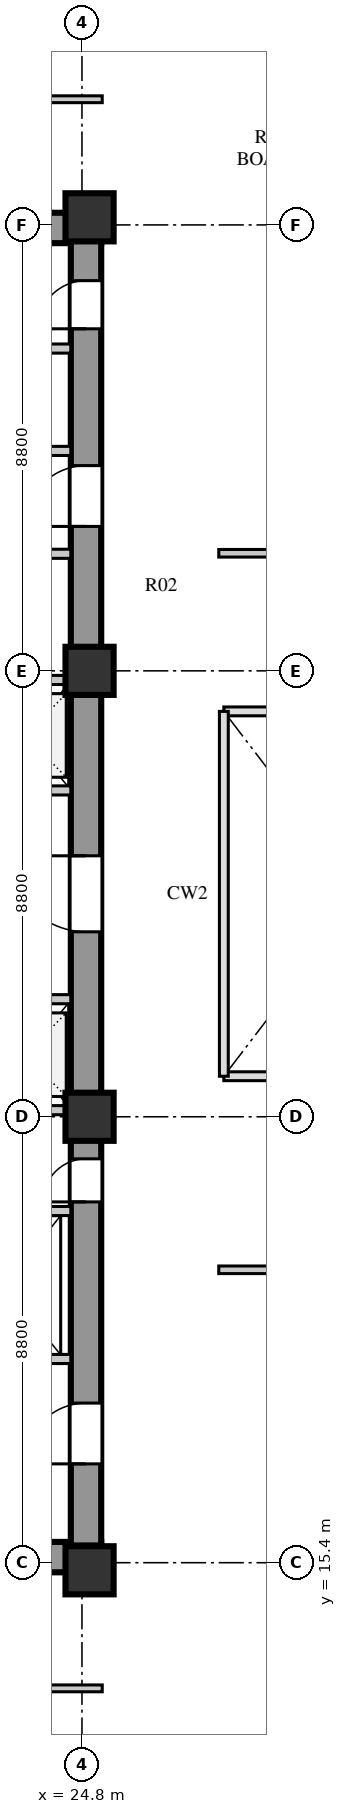
"""IFC4 building model, lengths in metres.
Left out: names, types, materials, properties, quantities, classifications, styles, units other than length and angle.
Written with IfcOpenShell. Run it as: python <this file> out.ifc"""

import sys

from ifc_helpers import new_model, si_unit, direction, frame, frame_2d, origin, origin_2d, place, context, subcontext, project, spatial, rectangle, extrude, element, fill, save


model = new_model("IFC4")
c1 = context("Model", 3, precision=1e-05, world=origin(), true_north=direction((0.0, 1.0)))
c2 = subcontext(c1, "Body", "Model", "MODEL_VIEW")
j1 = project(units=[si_unit("LENGTHUNIT", "METRE"), si_unit("PLANEANGLEUNIT", "RADIAN")], contexts=[c1])
p1 = place(None, origin())
s1 = spatial("IfcSite", under=j1, at=p1, CompositionType="ELEMENT")
p2 = place(p1, origin())
s2 = spatial("IfcBuilding", under=s1, at=p2, CompositionType="ELEMENT")
p3 = place(p2, frame((0.0, 0.0, 21.5)))
s3 = spatial("IfcBuildingStorey", under=s2, at=p3, CompositionType="ELEMENT", Elevation=21.5)
for number, where, z_axis, x_axis in (
    (1, (15.3, 15.51, 0.0), (0.0, 0.0, 1.0), (1.0, 0.0, 0.0)),
    (2, (15.3, 41.74, 0.0), (0.0, 0.0, 1.0), (1.0, 0.0, 0.0)),
):
    element("IfcWall", number, at=place(p3, frame(where, z_axis=z_axis, x_axis=x_axis)), inside=s3, PredefinedType="SHEAR", context=c2, shape_type="SweptSolid", body=[
        extrude(rectangle(XDim=9.88, YDim=0.6, at=frame_2d((4.94, 0.0))), origin(), (0.0, 0.0, 1.0), 4.22),
    ])
p4 = place(p3, frame((24.88, 15.74, 0.0), z_axis=(0.0, 0.0, 1.0), x_axis=(0.0, 1.0, 0.0)))
e3 = element("IfcWall", 3, at=p4, inside=s3, PredefinedType="SHEAR", context=c2, shape_type="SweptSolid", body=[
    extrude(rectangle(XDim=25.76, YDim=0.6, at=frame_2d((12.88, 0.0))), origin(), (0.0, 0.0, 1.0), 4.22),
])
p5 = place(p4, frame((1.61, 0.0, 0.0)))
e4 = element("IfcOpeningElement", 4, at=p5, cuts=e3, PredefinedType="OPENING", context=c2, shape_type="SweptSolid", body=[
    extrude(rectangle(XDim=1.2, YDim=2.1, at=frame_2d((0.6, 1.05))), frame((0.0, 0.31, 0.0), z_axis=(0.0, -1.0, 0.0), x_axis=(1.0, 0.0, 0.0)), (0.0, 0.0, 1.0), 0.62),
])
p6 = place(p4, frame((6.78, 0.0, 0.0)))
e5 = element("IfcOpeningElement", 5, at=p6, cuts=e3, PredefinedType="OPENING", context=c2, shape_type="SweptSolid", body=[
    extrude(rectangle(XDim=0.85, YDim=2.06, at=frame_2d((0.425, 1.03))), frame((0.0, 0.31, 0.0), z_axis=(0.0, -1.0, 0.0), x_axis=(1.0, 0.0, 0.0)), (0.0, 0.0, 1.0), 0.62),
])
p7 = place(p4, frame((12.11, 0.0, 0.0)))
e6 = element("IfcOpeningElement", 6, at=p7, cuts=e3, PredefinedType="OPENING", context=c2, shape_type="SweptSolid", body=[
    extrude(rectangle(XDim=1.5, YDim=2.12, at=frame_2d((0.75, 1.06))), frame((0.0, 0.31, 0.0), z_axis=(0.0, -1.0, 0.0), x_axis=(1.0, 0.0, 0.0)), (0.0, 0.0, 1.0), 0.62),
])
p8 = place(p4, frame((20.11, 0.0, 0.0)))
e7 = element("IfcOpeningElement", 7, at=p8, cuts=e3, PredefinedType="OPENING", context=c2, shape_type="SweptSolid", body=[
    extrude(rectangle(XDim=1.2, YDim=2.12, at=frame_2d((0.6, 1.06))), frame((0.0, 0.31, 0.0), z_axis=(0.0, -1.0, 0.0), x_axis=(1.0, 0.0, 0.0)), (0.0, 0.0, 1.0), 0.62),
])
p9 = place(p4, frame((24.01, 0.0, 0.0)))
e8 = element("IfcOpeningElement", 8, at=p9, cuts=e3, PredefinedType="OPENING", context=c2, shape_type="SweptSolid", body=[
    extrude(rectangle(XDim=0.95, YDim=2.1, at=frame_2d((0.475, 1.05))), frame((0.0, 0.31, 0.0), z_axis=(0.0, -1.0, 0.0), x_axis=(1.0, 0.0, 0.0)), (0.0, 0.0, 1.0), 0.62),
])
for number, where, z_axis, x_axis in (
    (9, (24.95, 15.25, 0.0), (0.0, 0.0, 1.0), (1.0, 0.0, 0.0)),
    (10, (24.95, 24.2, 0.0), (0.0, 0.0, 1.0), (1.0, 0.0, 0.0)),
    (11, (24.95, 33.0, 0.0), (0.0, 0.0, 1.0), (1.0, 0.0, 0.0)),
    (12, (24.95, 41.95, 0.0), (0.0, 0.0, 1.0), (1.0, 0.0, 0.0)),
):
    element("IfcColumn", number, at=place(p3, frame(where, z_axis=z_axis, x_axis=x_axis)), inside=s3, PredefinedType="COLUMN", context=c2, shape_type="SweptSolid", body=[
        extrude(rectangle(XDim=0.95, YDim=0.95, at=origin_2d()), origin(), (0.0, 0.0, 1.0), 4.22),
    ])
p10 = place(p3, frame((19.64, 19.42, 0.0), z_axis=(0.0, 0.0, 1.0), x_axis=(1.0, 0.0, 0.0)))
e13 = element("IfcWall", 13, at=p10, inside=s3, PredefinedType="SOLIDWALL", context=c2, shape_type="SweptSolid", body=[
    extrude(rectangle(XDim=4.94, YDim=0.18, at=frame_2d((2.47, 0.0))), origin(), (0.0, 0.0, 1.0), 4.22),
])
p11 = place(p10, frame((0.72, 0.0, 0.0)))
e14 = element("IfcOpeningElement", 14, at=p11, cuts=e13, PredefinedType="OPENING", context=c2, shape_type="SweptSolid", body=[
    extrude(rectangle(XDim=1.1, YDim=2.1, at=frame_2d((0.55, 1.05))), frame((0.0, 0.1, 0.0), z_axis=(0.0, -1.0, 0.0), x_axis=(1.0, 0.0, 0.0)), (0.0, 0.0, 1.0), 0.2),
])
p12 = place(p10, frame((3.02, 0.0, 0.0)))
e15 = element("IfcOpeningElement", 15, at=p12, cuts=e13, PredefinedType="OPENING", context=c2, shape_type="SweptSolid", body=[
    extrude(rectangle(XDim=1.1, YDim=2.1, at=frame_2d((0.55, 1.05))), frame((0.0, 0.1, 0.0), z_axis=(0.0, -1.0, 0.0), x_axis=(1.0, 0.0, 0.0)), (0.0, 0.0, 1.0), 0.2),
])
p13 = place(p3, frame((19.64, 22.34, 0.0), z_axis=(0.0, 0.0, 1.0), x_axis=(1.0, 0.0, 0.0)))
e16 = element("IfcWall", 16, at=p13, inside=s3, PredefinedType="SOLIDWALL", context=c2, shape_type="SweptSolid", body=[
    extrude(rectangle(XDim=4.94, YDim=0.18, at=frame_2d((2.47, 0.0))), origin(), (0.0, 0.0, 1.0), 4.22),
])
p14 = place(p3, frame((15.9, 26.52, 0.0), z_axis=(0.0, 0.0, 1.0), x_axis=(1.0, 0.0, 0.0)))
e17 = element("IfcWall", 17, at=p14, inside=s3, PredefinedType="SOLIDWALL", context=c2, shape_type="SweptSolid", body=[
    extrude(rectangle(XDim=8.68, YDim=0.18, at=frame_2d((4.34, 0.0))), origin(), (0.0, 0.0, 1.0), 4.22),
])
p15 = place(p14, frame((1.76, 0.0, 0.0)))
e18 = element("IfcOpeningElement", 18, at=p15, cuts=e17, PredefinedType="OPENING", context=c2, shape_type="SweptSolid", body=[
    extrude(rectangle(XDim=1.0, YDim=2.1, at=frame_2d((0.5, 1.05))), frame((0.0, 0.1, 0.0), z_axis=(0.0, -1.0, 0.0), x_axis=(1.0, 0.0, 0.0)), (0.0, 0.0, 1.0), 0.2),
])
p16 = place(p14, frame((3.6, 0.0, 0.0)))
e19 = element("IfcOpeningElement", 19, at=p16, cuts=e17, PredefinedType="OPENING", context=c2, shape_type="SweptSolid", body=[
    extrude(rectangle(XDim=1.0, YDim=2.1, at=frame_2d((0.5, 1.05))), frame((0.0, 0.1, 0.0), z_axis=(0.0, -1.0, 0.0), x_axis=(1.0, 0.0, 0.0)), (0.0, 0.0, 1.0), 0.2),
])
p17 = place(p14, frame((5.44, 0.0, 0.0)))
e20 = element("IfcOpeningElement", 20, at=p17, cuts=e17, PredefinedType="OPENING", context=c2, shape_type="SweptSolid", body=[
    extrude(rectangle(XDim=1.0, YDim=2.1, at=frame_2d((0.5, 1.05))), frame((0.0, 0.1, 0.0), z_axis=(0.0, -1.0, 0.0), x_axis=(1.0, 0.0, 0.0)), (0.0, 0.0, 1.0), 0.2),
])
p18 = place(p14, frame((7.28, 0.0, 0.0)))
e21 = element("IfcOpeningElement", 21, at=p18, cuts=e17, PredefinedType="OPENING", context=c2, shape_type="SweptSolid", body=[
    extrude(rectangle(XDim=1.0, YDim=2.1, at=frame_2d((0.5, 1.05))), frame((0.0, 0.1, 0.0), z_axis=(0.0, -1.0, 0.0), x_axis=(1.0, 0.0, 0.0)), (0.0, 0.0, 1.0), 0.2),
])
p19 = place(p3, frame((15.9, 24.33, 0.0), z_axis=(0.0, 0.0, 1.0), x_axis=(1.0, 0.0, 0.0)))
e22 = element("IfcWall", 22, at=p19, inside=s3, PredefinedType="SOLIDWALL", context=c2, shape_type="SweptSolid", body=[
    extrude(rectangle(XDim=8.68, YDim=0.18, at=frame_2d((4.34, 0.0))), origin(), (0.0, 0.0, 1.0), 3.42),
])
p20 = place(p3, frame((15.9, 30.64, 0.0), z_axis=(0.0, 0.0, 1.0), x_axis=(1.0, 0.0, 0.0)))
e23 = element("IfcWall", 23, at=p20, inside=s3, PredefinedType="SOLIDWALL", context=c2, shape_type="SweptSolid", body=[
    extrude(rectangle(XDim=8.68, YDim=0.18, at=frame_2d((4.34, 0.0))), origin(), (0.0, 0.0, 1.0), 4.22),
])
p21 = place(p20, frame((1.76, 0.0, 0.0)))
e24 = element("IfcOpeningElement", 24, at=p21, cuts=e23, PredefinedType="OPENING", context=c2, shape_type="SweptSolid", body=[
    extrude(rectangle(XDim=1.0, YDim=2.1, at=frame_2d((0.5, 1.05))), frame((0.0, 0.1, 0.0), z_axis=(0.0, -1.0, 0.0), x_axis=(1.0, 0.0, 0.0)), (0.0, 0.0, 1.0), 0.2),
])
p22 = place(p20, frame((3.6, 0.0, 0.0)))
e25 = element("IfcOpeningElement", 25, at=p22, cuts=e23, PredefinedType="OPENING", context=c2, shape_type="SweptSolid", body=[
    extrude(rectangle(XDim=1.0, YDim=2.1, at=frame_2d((0.5, 1.05))), frame((0.0, 0.1, 0.0), z_axis=(0.0, -1.0, 0.0), x_axis=(1.0, 0.0, 0.0)), (0.0, 0.0, 1.0), 0.2),
])
p23 = place(p20, frame((5.44, 0.0, 0.0)))
e26 = element("IfcOpeningElement", 26, at=p23, cuts=e23, PredefinedType="OPENING", context=c2, shape_type="SweptSolid", body=[
    extrude(rectangle(XDim=1.0, YDim=2.1, at=frame_2d((0.5, 1.05))), frame((0.0, 0.1, 0.0), z_axis=(0.0, -1.0, 0.0), x_axis=(1.0, 0.0, 0.0)), (0.0, 0.0, 1.0), 0.2),
])
p24 = place(p20, frame((7.28, 0.0, 0.0)))
e27 = element("IfcOpeningElement", 27, at=p24, cuts=e23, PredefinedType="OPENING", context=c2, shape_type="SweptSolid", body=[
    extrude(rectangle(XDim=1.0, YDim=2.1, at=frame_2d((0.5, 1.05))), frame((0.0, 0.1, 0.0), z_axis=(0.0, -1.0, 0.0), x_axis=(1.0, 0.0, 0.0)), (0.0, 0.0, 1.0), 0.2),
])
p25 = place(p3, frame((15.9, 32.82, 0.0), z_axis=(0.0, 0.0, 1.0), x_axis=(1.0, 0.0, 0.0)))
e28 = element("IfcWall", 28, at=p25, inside=s3, PredefinedType="SOLIDWALL", context=c2, shape_type="SweptSolid", body=[
    extrude(rectangle(XDim=8.68, YDim=0.18, at=frame_2d((4.34, 0.0))), origin(), (0.0, 0.0, 1.0), 3.42),
])
p26 = place(p3, frame((22.02, 35.31, 0.0), z_axis=(0.0, 0.0, 1.0), x_axis=(1.0, 0.0, 0.0)))
e29 = element("IfcWall", 29, at=p26, inside=s3, PredefinedType="SOLIDWALL", context=c2, shape_type="SweptSolid", body=[
    extrude(rectangle(XDim=2.56, YDim=0.18, at=frame_2d((1.28, 0.0))), origin(), (0.0, 0.0, 1.0), 4.22),
])
p27 = place(p26, frame((0.55, 0.0, 0.0)))
e30 = element("IfcOpeningElement", 30, at=p27, cuts=e29, PredefinedType="OPENING", context=c2, shape_type="SweptSolid", body=[
    extrude(rectangle(XDim=1.0, YDim=2.1, at=frame_2d((0.5, 1.05))), frame((0.0, 0.1, 0.0), z_axis=(0.0, -1.0, 0.0), x_axis=(1.0, 0.0, 0.0)), (0.0, 0.0, 1.0), 0.2),
])
p28 = place(p3, frame((19.64, 37.34, 0.0), z_axis=(0.0, 0.0, 1.0), x_axis=(1.0, 0.0, 0.0)))
e31 = element("IfcWall", 31, at=p28, inside=s3, PredefinedType="SOLIDWALL", context=c2, shape_type="SweptSolid", body=[
    extrude(rectangle(XDim=4.94, YDim=0.18, at=frame_2d((2.47, 0.0))), origin(), (0.0, 0.0, 1.0), 4.22),
])
p29 = place(p28, frame((0.45, 0.0, 0.0)))
e32 = element("IfcOpeningElement", 32, at=p29, cuts=e31, PredefinedType="OPENING", context=c2, shape_type="SweptSolid", body=[
    extrude(rectangle(XDim=1.0, YDim=2.1, at=frame_2d((0.5, 1.05))), frame((0.0, 0.1, 0.0), z_axis=(0.0, -1.0, 0.0), x_axis=(1.0, 0.0, 0.0)), (0.0, 0.0, 1.0), 0.2),
])
p30 = place(p28, frame((2.5, 0.0, 0.0)))
e33 = element("IfcOpeningElement", 33, at=p30, cuts=e31, PredefinedType="OPENING", context=c2, shape_type="SweptSolid", body=[
    extrude(rectangle(XDim=1.0, YDim=2.1, at=frame_2d((0.5, 1.05))), frame((0.0, 0.1, 0.0), z_axis=(0.0, -1.0, 0.0), x_axis=(1.0, 0.0, 0.0)), (0.0, 0.0, 1.0), 0.2),
])
p31 = place(p3, frame((19.64, 39.36, 0.0), z_axis=(0.0, 0.0, 1.0), x_axis=(1.0, 0.0, 0.0)))
e34 = element("IfcWall", 34, at=p31, inside=s3, PredefinedType="SOLIDWALL", context=c2, shape_type="SweptSolid", body=[
    extrude(rectangle(XDim=4.94, YDim=0.18, at=frame_2d((2.47, 0.0))), origin(), (0.0, 0.0, 1.0), 4.22),
])
p32 = place(p3, frame((15.2, 12.92, 0.0), z_axis=(0.0, 0.0, 1.0), x_axis=(1.0, 0.0, 0.0)))
e35 = element("IfcWall", 35, at=p32, inside=s3, PredefinedType="PARTITIONING", context=c2, shape_type="SweptSolid", body=[
    extrude(rectangle(XDim=10.0, YDim=0.135, at=frame_2d((5.0, 0.0))), origin(), (0.0, 0.0, 1.0), 4.22),
])
p33 = place(p32, frame((3.6, 0.0, 0.0)))
e36 = element("IfcOpeningElement", 36, at=p33, cuts=e35, PredefinedType="OPENING", context=c2, shape_type="SweptSolid", body=[
    extrude(rectangle(XDim=1.05, YDim=2.1, at=frame_2d((0.525, 1.05))), frame((0.0, 0.078, 0.0), z_axis=(0.0, -1.0, 0.0), x_axis=(1.0, 0.0, 0.0)), (0.0, 0.0, 1.0), 0.155),
])
p34 = place(p3, frame((15.2, 44.28, 0.0), z_axis=(0.0, 0.0, 1.0), x_axis=(1.0, 0.0, 0.0)))
e37 = element("IfcWall", 37, at=p34, inside=s3, PredefinedType="PARTITIONING", context=c2, shape_type="SweptSolid", body=[
    extrude(rectangle(XDim=10.0, YDim=0.135, at=frame_2d((5.0, 0.0))), origin(), (0.0, 0.0, 1.0), 4.22),
])
p35 = place(p34, frame((3.6, 0.0, 0.0)))
e38 = element("IfcOpeningElement", 38, at=p35, cuts=e37, PredefinedType="OPENING", context=c2, shape_type="SweptSolid", body=[
    extrude(rectangle(XDim=1.05, YDim=2.1, at=frame_2d((0.525, 1.05))), frame((0.0, 0.078, 0.0), z_axis=(0.0, -1.0, 0.0), x_axis=(1.0, 0.0, 0.0)), (0.0, 0.0, 1.0), 0.155),
])
p36 = place(p3, frame((27.5, 21.18, 0.0), z_axis=(0.0, 0.0, 1.0), x_axis=(1.0, 0.0, 0.0)))
e39 = element("IfcWall", 39, at=p36, inside=s3, PredefinedType="PARTITIONING", context=c2, shape_type="SweptSolid", body=[
    extrude(rectangle(XDim=7.45, YDim=0.15, at=frame_2d((3.725, 0.0))), origin(), (0.0, 0.0, 1.0), 3.82),
])
p37 = place(p36, frame((5.1, 0.0, 0.0)))
e40 = element("IfcOpeningElement", 40, at=p37, cuts=e39, PredefinedType="OPENING", context=c2, shape_type="SweptSolid", body=[
    extrude(rectangle(XDim=0.95, YDim=2.08, at=frame_2d((0.475, 1.04))), frame((0.0, 0.085, 0.0), z_axis=(0.0, -1.0, 0.0), x_axis=(1.0, 0.0, 0.0)), (0.0, 0.0, 1.0), 0.17),
])
p38 = place(p36, frame((2.3, 0.0, 0.0)))
e41 = element("IfcOpeningElement", 41, at=p38, cuts=e39, PredefinedType="OPENING", context=c2, shape_type="SweptSolid", body=[
    extrude(rectangle(XDim=1.35, YDim=2.1, at=frame_2d((0.675, 1.05))), frame((0.0, 0.085, 0.0), z_axis=(0.0, -1.0, 0.0), x_axis=(1.0, 0.0, 0.0)), (0.0, 0.0, 1.0), 0.17),
])
p39 = place(p3, frame((27.5, 35.32, 0.0), z_axis=(0.0, 0.0, 1.0), x_axis=(1.0, 0.0, 0.0)))
e42 = element("IfcWall", 42, at=p39, inside=s3, PredefinedType="PARTITIONING", context=c2, shape_type="SweptSolid", body=[
    extrude(rectangle(XDim=7.22, YDim=0.15, at=frame_2d((3.61, 0.0))), origin(), (0.0, 0.0, 1.0), 4.22),
])
p40 = place(p39, frame((5.0, 0.0, 0.0)))
e43 = element("IfcOpeningElement", 43, at=p40, cuts=e42, PredefinedType="OPENING", context=c2, shape_type="SweptSolid", body=[
    extrude(rectangle(XDim=0.95, YDim=2.08, at=frame_2d((0.475, 1.04))), frame((0.0, 0.085, 0.0), z_axis=(0.0, -1.0, 0.0), x_axis=(1.0, 0.0, 0.0)), (0.0, 0.0, 1.0), 0.17),
])
p41 = place(p39, frame((2.0, 0.0, 0.0)))
e44 = element("IfcOpeningElement", 44, at=p41, cuts=e42, PredefinedType="OPENING", context=c2, shape_type="SweptSolid", body=[
    extrude(rectangle(XDim=1.35, YDim=2.1, at=frame_2d((0.675, 1.05))), frame((0.0, 0.085, 0.0), z_axis=(0.0, -1.0, 0.0), x_axis=(1.0, 0.0, 0.0)), (0.0, 0.0, 1.0), 0.17),
])
p42 = place(p5, frame((1.2, 0.0, 0.0), z_axis=(0.0, 0.0, 1.0), x_axis=(-1.0, 0.0, 0.0)))
e45 = element("IfcDoor", 45, at=p42, inside=s3, OperationType="SINGLE_SWING_RIGHT", PredefinedType="DOOR", context=c2, shape_type="SweptSolid", body=[
    extrude(rectangle(XDim=1.2, YDim=2.1, at=frame_2d((0.6, 1.05))), frame((0.0, 0.025, 0.0), z_axis=(0.0, -1.0, 0.0), x_axis=(1.0, 0.0, 0.0)), (0.0, 0.0, 1.0), 0.05),
])
fill(e4, e45)
p43 = place(p6, frame((0.85, 0.0, 0.0), z_axis=(0.0, 0.0, 1.0), x_axis=(-1.0, 0.0, 0.0)))
e46 = element("IfcDoor", 46, at=p43, inside=s3, OperationType="SINGLE_SWING_RIGHT", PredefinedType="DOOR", context=c2, shape_type="SweptSolid", body=[
    extrude(rectangle(XDim=0.85, YDim=2.06, at=frame_2d((0.425, 1.03))), frame((0.0, 0.025, 0.0), z_axis=(0.0, -1.0, 0.0), x_axis=(1.0, 0.0, 0.0)), (0.0, 0.0, 1.0), 0.05),
])
fill(e5, e46)
p44 = place(p7, frame((1.5, 0.0, 0.0), z_axis=(0.0, 0.0, 1.0), x_axis=(-1.0, 0.0, 0.0)))
e47 = element("IfcDoor", 47, at=p44, inside=s3, OperationType="SINGLE_SWING_LEFT", PredefinedType="DOOR", context=c2, shape_type="SweptSolid", body=[
    extrude(rectangle(XDim=1.5, YDim=2.12, at=frame_2d((0.75, 1.06))), frame((0.0, 0.025, 0.0), z_axis=(0.0, -1.0, 0.0), x_axis=(1.0, 0.0, 0.0)), (0.0, 0.0, 1.0), 0.05),
])
fill(e6, e47)
p45 = place(p8, frame((1.2, 0.0, 0.0), z_axis=(0.0, 0.0, 1.0), x_axis=(-1.0, 0.0, 0.0)))
e48 = element("IfcDoor", 48, at=p45, inside=s3, OperationType="SINGLE_SWING_RIGHT", PredefinedType="DOOR", context=c2, shape_type="SweptSolid", body=[
    extrude(rectangle(XDim=1.2, YDim=2.12, at=frame_2d((0.6, 1.06))), frame((0.0, 0.025, 0.0), z_axis=(0.0, -1.0, 0.0), x_axis=(1.0, 0.0, 0.0)), (0.0, 0.0, 1.0), 0.05),
])
fill(e7, e48)
p46 = place(p9, frame((0.95, 0.0, 0.0), z_axis=(0.0, 0.0, 1.0), x_axis=(-1.0, 0.0, 0.0)))
e49 = element("IfcDoor", 49, at=p46, inside=s3, OperationType="SINGLE_SWING_RIGHT", PredefinedType="DOOR", context=c2, shape_type="SweptSolid", body=[
    extrude(rectangle(XDim=0.95, YDim=2.1, at=frame_2d((0.475, 1.05))), frame((0.0, 0.025, 0.0), z_axis=(0.0, -1.0, 0.0), x_axis=(1.0, 0.0, 0.0)), (0.0, 0.0, 1.0), 0.05),
])
fill(e8, e49)
save(model, sys.argv[1])
